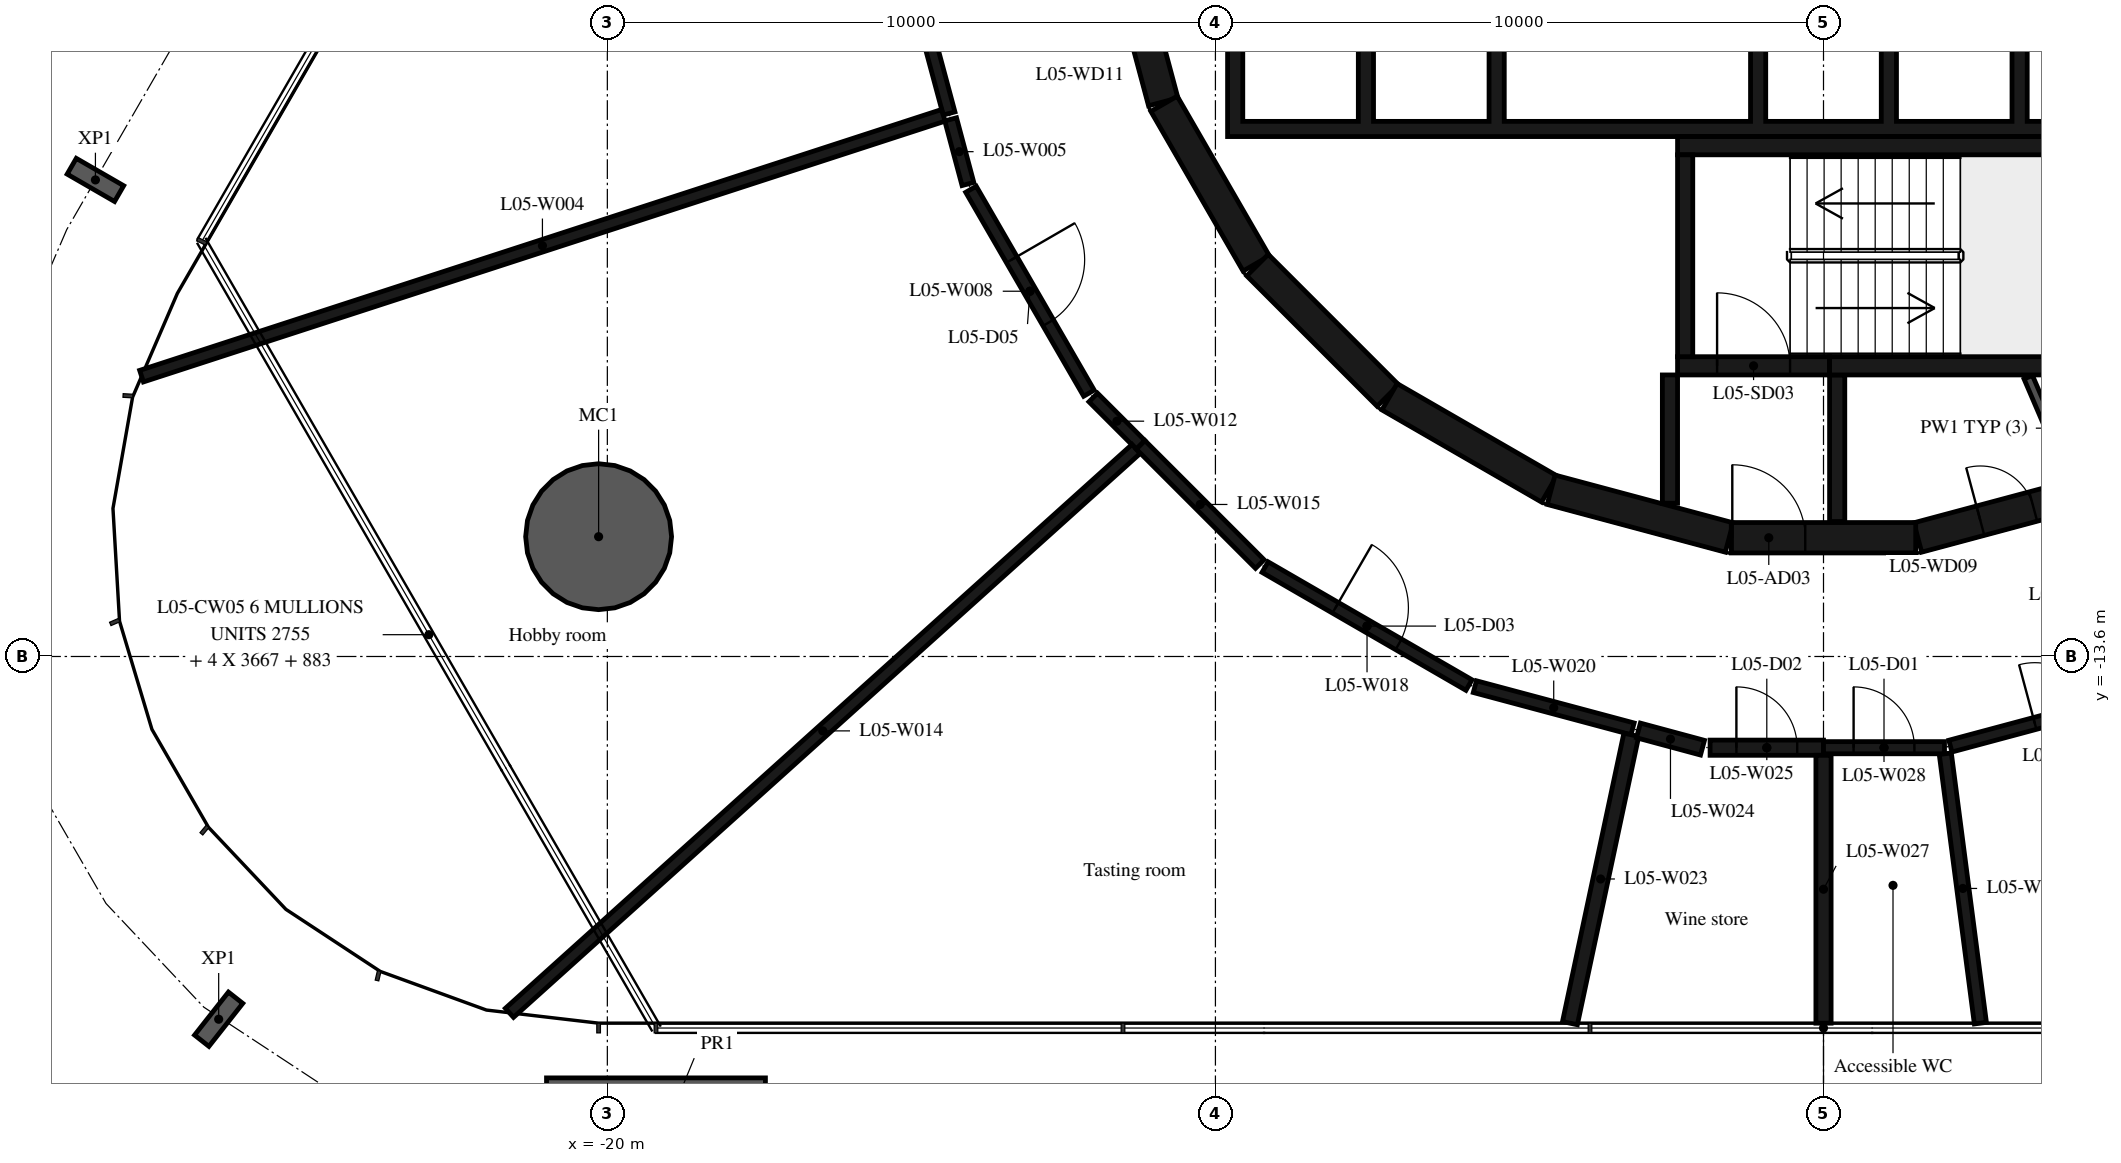
"""IFC4 building model, lengths in metres.
Left out: names, types, materials, properties, quantities, classifications, styles, units other than length and angle.
Written with IfcOpenShell. Run it as: python <this file> out.ifc"""

import sys

from ifc_helpers import new_model, si_unit, direction, frame, frame_2d, origin, origin_2d, place, context, subcontext, project, spatial, polyline, rectangle, hollow_circle, i_section, outline, extrude, element, fill, save


model = new_model("IFC4")
c1 = context("Model", 3, precision=1e-05, world=origin(), true_north=direction((0.0, 1.0)))
c2 = subcontext(c1, "Body", "Model", "MODEL_VIEW")
j1 = project(units=[si_unit("LENGTHUNIT", "METRE"), si_unit("PLANEANGLEUNIT", "RADIAN")], contexts=[c1])
p1 = place(None, origin())
s1 = spatial("IfcSite", under=j1, at=p1, CompositionType="ELEMENT")
p2 = place(p1, origin())
s2 = spatial("IfcBuilding", under=s1, at=p2, CompositionType="ELEMENT")
p3 = place(p2, frame((0.0, 0.0, 28.2)))
s3 = spatial("IfcBuildingStorey", under=s2, at=p3, CompositionType="ELEMENT", Elevation=28.2)
p4 = place(p3, frame((-20.144, -11.63, -0.38), z_axis=(0.0, 0.0, 1.0), x_axis=(1.0, 0.0, 0.0)))
e1 = element("IfcColumn", 1, at=p4, inside=s3, PredefinedType="COLUMN", context=c2, shape_type="SweptSolid", body=[
    extrude(hollow_circle(Radius=1.2, WallThickness=0.06, at=origin_2d()), origin(), (0.0, 0.0, 1.0), 4.73),
])
for number, where, z_axis, x_axis in (
    (2, (-28.419, -5.763, -0.38), (0.0, 0.0, 1.0), (0.5, 0.866, 0.0)),
    (3, (-26.392, -19.565, -0.38), (0.0, 0.0, 1.0), (-0.786, 0.619, 0.0)),
):
    element("IfcColumn", number, at=place(p3, frame(where, z_axis=z_axis, x_axis=x_axis)), inside=s3, PredefinedType="COLUMN", context=c2, shape_type="SweptSolid", body=[
        extrude(i_section(OverallWidth=0.3, OverallDepth=0.9, WebThickness=0.019, FlangeThickness=0.035, FilletRadius=0.03, at=origin_2d()), origin(), (0.0, 0.0, 1.0), 4.73),
    ])
p5 = place(p3, frame((-19.2, -21.73, -0.38), z_axis=(0.0, 0.0, 1.0), x_axis=(1.0, 0.0, 0.0)))
e4 = element("IfcColumn", 4, at=p5, inside=s3, PredefinedType="COLUMN", context=c2, shape_type="SweptSolid", body=[
    extrude(rectangle(XDim=3.6, YDim=2.4, at=origin_2d()), origin(), (0.0, 0.0, 1.0), 3.722),
])
p6 = place(p3, frame((1.55, -11.643, 0.0), z_axis=(0.0, 0.0, 1.0), x_axis=(0.965948410781, 0.258734743916, 0.0)))
e5 = element("IfcWall", 5, at=p6, inside=s3, PredefinedType="SHEAR", context=c2, shape_type="SweptSolid", body=[
    extrude(rectangle(XDim=3.033, YDim=0.5, at=frame_2d((1.516, 0.0))), origin(), (0.0, 0.0, 1.0), 4.35),
])
p7 = place(p6, frame((1.066, 0.0, 0.0)))
e6 = element("IfcOpeningElement", 6, at=p7, cuts=e5, PredefinedType="OPENING", context=c2, shape_type="SweptSolid", body=[
    extrude(rectangle(XDim=0.9, YDim=2.1, at=frame_2d((0.45, 1.05))), frame((0.0, 0.26, 0.0), z_axis=(0.0, -1.0, 0.0), x_axis=(1.0, 0.0, 0.0)), (0.0, 0.0, 1.0), 0.52),
])
p8 = place(p3, frame((-11.643, -1.55, 0.0), z_axis=(0.0, 0.0, 1.0), x_axis=(0.258734743916, -0.965948410781, 0.0)))
e7 = element("IfcWall", 7, at=p8, inside=s3, PredefinedType="SHEAR", context=c2, shape_type="SweptSolid", body=[
    extrude(rectangle(XDim=3.033, YDim=0.5, at=frame_2d((1.516, 0.0))), origin(), (0.0, 0.0, 1.0), 4.35),
])
p9 = place(p8, frame((1.066, 0.0, 0.0)))
e8 = element("IfcOpeningElement", 8, at=p9, cuts=e7, PredefinedType="OPENING", context=c2, shape_type="SweptSolid", body=[
    extrude(rectangle(XDim=0.9, YDim=2.1, at=frame_2d((0.45, 1.05))), frame((0.0, 0.26, 0.0), z_axis=(0.0, -1.0, 0.0), x_axis=(1.0, 0.0, 0.0)), (0.0, 0.0, 1.0), 0.52),
])
p10 = place(p3, frame((-10.845, -4.51, 0.0), z_axis=(0.0, 0.0, 1.0), x_axis=(0.500087131594, -0.865975092491, 0.0)))
e9 = element("IfcWall", 9, at=p10, inside=s3, PredefinedType="SHEAR", context=c2, shape_type="SweptSolid", body=[
    extrude(rectangle(XDim=3.033, YDim=0.5, at=frame_2d((1.516, 0.0))), origin(), (0.0, 0.0, 1.0), 4.35),
])
p11 = place(p3, frame((-9.308, -7.164, 0.0), z_axis=(0.0, 0.0, 1.0), x_axis=(0.707106781187, -0.707106781187, 0.0)))
e10 = element("IfcWall", 10, at=p11, inside=s3, PredefinedType="SHEAR", context=c2, shape_type="SweptSolid", body=[
    extrude(rectangle(XDim=3.032, YDim=0.5, at=frame_2d((1.516, 0.0))), origin(), (0.0, 0.0, 1.0), 4.35),
])
for number, where, z_axis, x_axis in (
    (11, (-7.137, -9.329, 0.0), (0.0, 0.0, 1.0), (0.866, -0.5, 0.0)),
    (12, (-4.479, -10.858, 0.0), (0.0, 0.0, 1.0), (0.966, -0.259, 0.0)),
):
    element("IfcWall", number, at=place(p3, frame(where, z_axis=z_axis, x_axis=x_axis)), inside=s3, PredefinedType="SHEAR", context=c2, shape_type="SweptSolid", body=[
        extrude(rectangle(XDim=3.033, YDim=0.5, at=frame_2d((1.516, 0.0))), origin(), (0.0, 0.0, 1.0), 4.35),
    ])
p12 = place(p3, frame((-1.516, -11.647, 0.0), z_axis=(0.0, 0.0, 1.0), x_axis=(1.0, 0.0, 0.0)))
e13 = element("IfcWall", 13, at=p12, inside=s3, PredefinedType="SHEAR", context=c2, shape_type="SweptSolid", body=[
    extrude(rectangle(XDim=3.033, YDim=0.5, at=frame_2d((1.516, 0.0))), origin(), (0.0, 0.0, 1.0), 4.35),
])
p13 = place(p12, frame((0.016, 0.0, 0.0)))
e14 = element("IfcOpeningElement", 14, at=p13, cuts=e13, PredefinedType="OPENING", context=c2, shape_type="SweptSolid", body=[
    extrude(rectangle(XDim=1.2, YDim=2.1, at=frame_2d((0.6, 1.05))), frame((0.0, 0.26, 0.0), z_axis=(0.0, -1.0, 0.0), x_axis=(1.0, 0.0, 0.0)), (0.0, 0.0, 1.0), 0.52),
])
p14 = place(p3, frame((-2.275, -8.67, 0.0), z_axis=(0.0, 0.0, 1.0), x_axis=(0.0, 1.0, 0.0)))
e15 = element("IfcWall", 15, at=p14, inside=s3, PredefinedType="SHEAR", context=c2, shape_type="SweptSolid", body=[
    extrude(rectangle(XDim=3.32, YDim=0.25, at=frame_2d((1.66, 0.0))), origin(), (0.0, 0.0, 1.0), 4.35),
])
p15 = place(p3, frame((-2.4, -5.2, 0.0), z_axis=(0.0, 0.0, 1.0), x_axis=(1.0, 0.0, 0.0)))
e16 = element("IfcWall", 16, at=p15, inside=s3, PredefinedType="SHEAR", context=c2, shape_type="SweptSolid", body=[
    extrude(rectangle(XDim=7.05, YDim=0.3, at=frame_2d((3.525, 0.0))), origin(), (0.0, 0.0, 1.0), 4.35),
])
p16 = place(p3, frame((0.1, -8.82, 0.0), z_axis=(0.0, 0.0, 1.0), x_axis=(1.0, 0.0, 0.0)))
e17 = element("IfcWall", 17, at=p16, inside=s3, PredefinedType="SHEAR", context=c2, shape_type="SweptSolid", body=[
    extrude(rectangle(XDim=4.55, YDim=0.3, at=frame_2d((2.275, 0.0))), origin(), (0.0, 0.0, 1.0), 4.35),
])
p17 = place(p3, frame((-2.4, -8.82, 0.0), z_axis=(0.0, 0.0, 1.0), x_axis=(1.0, 0.0, 0.0)))
e18 = element("IfcWall", 18, at=p17, inside=s3, PredefinedType="SHEAR", context=c2, shape_type="SweptSolid", body=[
    extrude(rectangle(XDim=2.5, YDim=0.3, at=frame_2d((1.25, 0.0))), origin(), (0.0, 0.0, 1.0), 4.35),
])
p18 = place(p17, frame((0.65, 0.0, 0.0)))
e19 = element("IfcOpeningElement", 19, at=p18, cuts=e18, PredefinedType="OPENING", context=c2, shape_type="SweptSolid", body=[
    extrude(rectangle(XDim=1.2, YDim=2.1, at=frame_2d((0.6, 1.05))), frame((0.0, 0.16, 0.0), z_axis=(0.0, -1.0, 0.0), x_axis=(1.0, 0.0, 0.0)), (0.0, 0.0, 1.0), 0.32),
])
p19 = place(p3, frame((-2.525, -8.97, 0.0), z_axis=(0.0, 0.0, 1.0), x_axis=(0.0, -1.0, 0.0)))
e20 = element("IfcWall", 20, at=p19, inside=s3, PredefinedType="SHEAR", context=c2, shape_type="SweptSolid", body=[
    extrude(rectangle(XDim=2.11, YDim=0.25, at=frame_2d((1.055, 0.0))), origin(), (0.0, 0.0, 1.0), 4.35),
])
p20 = place(p3, frame((0.225, -8.97, 0.0), z_axis=(0.0, 0.0, 1.0), x_axis=(0.0, -1.0, 0.0)))
e21 = element("IfcWall", 21, at=p20, inside=s3, PredefinedType="SHEAR", context=c2, shape_type="SweptSolid", body=[
    extrude(rectangle(XDim=2.41, YDim=0.25, at=frame_2d((1.205, 0.0))), origin(), (0.0, 0.0, 1.0), 4.35),
])
p21 = place(p3, origin())
e22 = element("IfcWall", 22, at=p21, inside=s3, PredefinedType="SHEAR", context=c2, shape_type="SweptSolid", body=[
    extrude(outline(polyline([(9.8, -5.05), (9.8, -4.8), (9.8, -1.9), (9.55, -1.9), (9.55, -4.8), (7.65, -4.8), (7.65, -1.9), (7.4, -1.9), (7.4, -4.8), (5.5, -4.8), (5.5, -1.9), (5.25, -1.9), (5.25, -4.8), (3.35, -4.8), (3.35, -1.9), (3.1, -1.9), (3.1, -4.8), (1.2, -4.8), (1.2, -1.9), (0.95, -1.9), (0.95, -4.8), (-0.95, -4.8), (-0.95, -1.9), (-1.2, -1.9), (-1.2, -4.8), (-5.25, -4.8), (-5.25, -1.9), (-5.5, -1.9), (-5.5, -4.8), (-7.4, -4.8), (-7.4, -1.9), (-7.65, -1.9), (-7.65, -4.8), (-9.55, -4.8), (-9.55, -1.9), (-9.8, -1.9), (-9.8, -4.8), (-9.8, -5.05), (9.8, -5.05)])), origin(), (0.0, 0.0, 1.0), 4.35),
])
p22 = place(p3, frame((3.367, -9.007, 0.0), z_axis=(0.0, 0.0, 1.0), x_axis=(0.394387482265, -0.918944238696, 0.0)))
e23 = element("IfcWall", 23, at=p22, inside=s3, PredefinedType="PARTITIONING", context=c2, shape_type="SweptSolid", body=[
    extrude(rectangle(XDim=1.825, YDim=0.15, at=frame_2d((0.913, 0.0))), origin(), (0.0, 0.0, 1.0), 4.35),
])
p23 = place(p3, frame((-15.1, -1.99, 0.0), z_axis=(0.0, 0.0, 1.0), x_axis=(0.259534891826, -0.96573373138, 0.0)))
e24 = element("IfcWall", 24, at=p23, inside=s3, PredefinedType="PARTITIONING", context=c2, shape_type="SweptSolid", body=[
    extrude(rectangle(XDim=2.775, YDim=0.2, at=frame_2d((1.387, 0.0))), origin(), (0.0, 0.0, 1.0), 4.35),
])
p24 = place(p3, frame((-14.475, -4.701, 0.0), z_axis=(0.0, 0.0, 1.0), x_axis=(-0.950949275071, -0.309346854262, 0.0)))
e25 = element("IfcWall", 25, at=p24, inside=s3, PredefinedType="PARTITIONING", context=c2, shape_type="SweptSolid", body=[
    extrude(rectangle(XDim=13.865, YDim=0.2, at=frame_2d((6.933, 0.0))), origin(), (0.0, 0.0, 1.0), 4.35),
])
p25 = place(p3, frame((-14.354, -4.767, 0.0), z_axis=(0.0, 0.0, 1.0), x_axis=(0.258159565639, -0.966102292032, 0.0)))
e26 = element("IfcWall", 26, at=p25, inside=s3, PredefinedType="PARTITIONING", context=c2, shape_type="SweptSolid", body=[
    extrude(rectangle(XDim=1.101, YDim=0.2, at=frame_2d((0.55, 0.0))), origin(), (0.0, 0.0, 1.0), 4.35),
])
p26 = place(p3, frame((-14.02, -5.917, 0.0), z_axis=(0.0, 0.0, 1.0), x_axis=(0.500733182901, -0.865601686425, 0.0)))
e27 = element("IfcWall", 27, at=p26, inside=s3, PredefinedType="PARTITIONING", context=c2, shape_type="SweptSolid", body=[
    extrude(rectangle(XDim=3.874, YDim=0.2, at=frame_2d((1.937, 0.0))), origin(), (0.0, 0.0, 1.0), 4.35),
])
p27 = place(p26, frame((1.337, 0.0, 0.0)))
e28 = element("IfcOpeningElement", 28, at=p27, cuts=e27, PredefinedType="OPENING", context=c2, shape_type="SweptSolid", body=[
    extrude(rectangle(XDim=1.2, YDim=2.1, at=frame_2d((0.6, 1.05))), frame((0.0, 0.11, 0.0), z_axis=(0.0, -1.0, 0.0), x_axis=(1.0, 0.0, 0.0)), (0.0, 0.0, 1.0), 0.22),
])
p28 = place(p3, frame((-12.009, -9.341, 0.0), z_axis=(0.0, 0.0, 1.0), x_axis=(0.707106781187, -0.707106781187, 0.0)))
e29 = element("IfcWall", 29, at=p28, inside=s3, PredefinedType="PARTITIONING", context=c2, shape_type="SweptSolid", body=[
    extrude(rectangle(XDim=1.102, YDim=0.2, at=frame_2d((0.551, 0.0))), origin(), (0.0, 0.0, 1.0), 4.35),
])
p29 = place(p3, frame((-11.304, -10.187, 0.0), z_axis=(0.0, 0.0, 1.0), x_axis=(-0.743362442769, -0.668888838807, 0.0)))
e30 = element("IfcWall", 30, at=p29, inside=s3, PredefinedType="PARTITIONING", context=c2, shape_type="SweptSolid", body=[
    extrude(rectangle(XDim=13.864, YDim=0.2, at=frame_2d((6.932, 0.0))), origin(), (0.0, 0.0, 1.0), 4.35),
])
p30 = place(p3, frame((-11.23, -10.12, 0.0), z_axis=(0.0, 0.0, 1.0), x_axis=(0.707106781187, -0.707106781187, 0.0)))
e31 = element("IfcWall", 31, at=p30, inside=s3, PredefinedType="PARTITIONING", context=c2, shape_type="SweptSolid", body=[
    extrude(rectangle(XDim=2.772, YDim=0.2, at=frame_2d((1.386, 0.0))), origin(), (0.0, 0.0, 1.0), 4.35),
])
p31 = place(p3, frame((-9.183, -12.13, 0.0), z_axis=(0.0, 0.0, 1.0), x_axis=(0.865585884642, -0.500760497952, 0.0)))
e32 = element("IfcWall", 32, at=p31, inside=s3, PredefinedType="PARTITIONING", context=c2, shape_type="SweptSolid", body=[
    extrude(rectangle(XDim=3.874, YDim=0.2, at=frame_2d((1.937, 0.0))), origin(), (0.0, 0.0, 1.0), 4.35),
])
p32 = place(p31, frame((1.337, 0.0, 0.0)))
e33 = element("IfcOpeningElement", 33, at=p32, cuts=e32, PredefinedType="OPENING", context=c2, shape_type="SweptSolid", body=[
    extrude(rectangle(XDim=1.2, YDim=2.1, at=frame_2d((0.6, 1.05))), frame((0.0, 0.11, 0.0), z_axis=(0.0, -1.0, 0.0), x_axis=(1.0, 0.0, 0.0)), (0.0, 0.0, 1.0), 0.22),
])
p33 = place(p3, frame((-5.733, -14.096, 0.0), z_axis=(0.0, 0.0, 1.0), x_axis=(0.966003629213, -0.25852850587, 0.0)))
e34 = element("IfcWall", 34, at=p33, inside=s3, PredefinedType="PARTITIONING", context=c2, shape_type="SweptSolid", body=[
    extrude(rectangle(XDim=2.685, YDim=0.2, at=frame_2d((1.342, 0.0))), origin(), (0.0, 0.0, 1.0), 4.35),
])
p34 = place(p3, frame((-3.161, -14.888, 0.0), z_axis=(0.0, 0.0, 1.0), x_axis=(-0.208118919353, -0.978103530005, 0.0)))
e35 = element("IfcWall", 35, at=p34, inside=s3, PredefinedType="PARTITIONING", context=c2, shape_type="SweptSolid", body=[
    extrude(rectangle(XDim=4.848, YDim=0.25, at=frame_2d((2.424, 0.0))), origin(), (0.0, 0.0, 1.0), 4.35),
])
p35 = place(p3, frame((-3.043, -14.816, 0.0), z_axis=(0.0, 0.0, 1.0), x_axis=(0.965488181203, -0.260446869738, 0.0)))
e36 = element("IfcWall", 36, at=p35, inside=s3, PredefinedType="PARTITIONING", context=c2, shape_type="SweptSolid", body=[
    extrude(rectangle(XDim=1.091, YDim=0.25, at=frame_2d((0.545, 0.0))), origin(), (0.0, 0.0, 1.0), 4.35),
])
p36 = place(p3, frame((-1.865, -15.1, 0.0), z_axis=(0.0, 0.0, 1.0), x_axis=(1.0, 0.0, 0.0)))
e37 = element("IfcWall", 37, at=p36, inside=s3, PredefinedType="PARTITIONING", context=c2, shape_type="SweptSolid", body=[
    extrude(rectangle(XDim=1.865, YDim=0.25, at=frame_2d((0.933, 0.0))), origin(), (0.0, 0.0, 1.0), 4.35),
])
p37 = place(p36, frame((0.433, 0.0, 0.0)))
e38 = element("IfcOpeningElement", 38, at=p37, cuts=e37, PredefinedType="OPENING", context=c2, shape_type="SweptSolid", body=[
    extrude(rectangle(XDim=1.0, YDim=2.1, at=frame_2d((0.5, 1.05))), frame((0.0, 0.135, 0.0), z_axis=(0.0, -1.0, 0.0), x_axis=(1.0, 0.0, 0.0)), (0.0, 0.0, 1.0), 0.27),
])
p38 = place(p3, frame((0.0, -15.225, 0.0), z_axis=(0.0, 0.0, 1.0), x_axis=(0.0, -1.0, 0.0)))
e39 = element("IfcWall", 39, at=p38, inside=s3, PredefinedType="PARTITIONING", context=c2, shape_type="SweptSolid", body=[
    extrude(rectangle(XDim=4.405, YDim=0.25, at=frame_2d((2.202, 0.0))), origin(), (0.0, 0.0, 1.0), 4.35),
])
p39 = place(p3, frame((0.0, -15.1, 0.0), z_axis=(0.0, 0.0, 1.0), x_axis=(1.0, 0.0, 0.0)))
e40 = element("IfcWall", 40, at=p39, inside=s3, PredefinedType="PARTITIONING", context=c2, shape_type="SweptSolid", body=[
    extrude(rectangle(XDim=1.99, YDim=0.2, at=frame_2d((0.995, 0.0))), origin(), (0.0, 0.0, 1.0), 4.35),
])
p40 = place(p39, frame((0.495, 0.0, 0.0)))
e41 = element("IfcOpeningElement", 41, at=p40, cuts=e40, PredefinedType="OPENING", context=c2, shape_type="SweptSolid", body=[
    extrude(rectangle(XDim=1.0, YDim=2.1, at=frame_2d((0.5, 1.05))), frame((0.0, 0.11, 0.0), z_axis=(0.0, -1.0, 0.0), x_axis=(1.0, 0.0, 0.0)), (0.0, 0.0, 1.0), 0.22),
])
p41 = place(p3, frame((2.003, -15.199, 0.0), z_axis=(0.0, 0.0, 1.0), x_axis=(0.129170993983, -0.991622334517, 0.0)))
e42 = element("IfcWall", 42, at=p41, inside=s3, PredefinedType="PARTITIONING", context=c2, shape_type="SweptSolid", body=[
    extrude(rectangle(XDim=4.468, YDim=0.2, at=frame_2d((2.234, 0.0))), origin(), (0.0, 0.0, 1.0), 4.35),
])
p42 = place(p3, frame((2.087, -15.074, 0.0), z_axis=(0.0, 0.0, 1.0), x_axis=(0.965870133458, 0.259026804199, 0.0)))
e43 = element("IfcWall", 43, at=p42, inside=s3, PredefinedType="PARTITIONING", context=c2, shape_type="SweptSolid", body=[
    extrude(rectangle(XDim=3.876, YDim=0.2, at=frame_2d((1.938, 0.0))), origin(), (0.0, 0.0, 1.0), 4.35),
])
p43 = place(p42, frame((1.438, 0.0, 0.0)))
e44 = element("IfcOpeningElement", 44, at=p43, cuts=e43, PredefinedType="OPENING", context=c2, shape_type="SweptSolid", body=[
    extrude(rectangle(XDim=1.0, YDim=2.1, at=frame_2d((0.5, 1.05))), frame((0.0, 0.11, 0.0), z_axis=(0.0, -1.0, 0.0), x_axis=(1.0, 0.0, 0.0)), (0.0, 0.0, 1.0), 0.22),
])
p44 = place(p18, origin())
e45 = element("IfcDoor", 45, at=p44, inside=s3, OperationType="SINGLE_SWING_LEFT", PredefinedType="DOOR", context=c2, shape_type="SweptSolid", body=[
    extrude(rectangle(XDim=1.2, YDim=2.1, at=frame_2d((0.6, 1.05))), frame((0.0, 0.025, 0.0), z_axis=(0.0, -1.0, 0.0), x_axis=(1.0, 0.0, 0.0)), (0.0, 0.0, 1.0), 0.05),
])
fill(e19, e45)
p45 = place(p13, origin())
e46 = element("IfcDoor", 46, at=p45, inside=s3, OperationType="SINGLE_SWING_RIGHT", PredefinedType="DOOR", context=c2, shape_type="SweptSolid", body=[
    extrude(rectangle(XDim=1.2, YDim=2.1, at=frame_2d((0.6, 1.05))), frame((0.0, 0.025, 0.0), z_axis=(0.0, -1.0, 0.0), x_axis=(1.0, 0.0, 0.0)), (0.0, 0.0, 1.0), 0.05),
])
fill(e14, e46)
p46 = place(p7, origin())
e47 = element("IfcDoor", 47, at=p46, inside=s3, OperationType="SINGLE_SWING_RIGHT", PredefinedType="DOOR", context=c2, shape_type="SweptSolid", body=[
    extrude(rectangle(XDim=0.9, YDim=2.1, at=frame_2d((0.45, 1.05))), frame((0.0, 0.025, 0.0), z_axis=(0.0, -1.0, 0.0), x_axis=(1.0, 0.0, 0.0)), (0.0, 0.0, 1.0), 0.05),
])
fill(e6, e47)
p47 = place(p40, origin())
e48 = element("IfcDoor", 48, at=p47, inside=s3, OperationType="SINGLE_SWING_LEFT", PredefinedType="DOOR", context=c2, shape_type="SweptSolid", body=[
    extrude(rectangle(XDim=1.0, YDim=2.1, at=frame_2d((0.5, 1.05))), frame((0.0, 0.025, 0.0), z_axis=(0.0, -1.0, 0.0), x_axis=(1.0, 0.0, 0.0)), (0.0, 0.0, 1.0), 0.05),
])
fill(e41, e48)
p48 = place(p37, origin())
e49 = element("IfcDoor", 49, at=p48, inside=s3, OperationType="SINGLE_SWING_LEFT", PredefinedType="DOOR", context=c2, shape_type="SweptSolid", body=[
    extrude(rectangle(XDim=1.0, YDim=2.1, at=frame_2d((0.5, 1.05))), frame((0.0, 0.025, 0.0), z_axis=(0.0, -1.0, 0.0), x_axis=(1.0, 0.0, 0.0)), (0.0, 0.0, 1.0), 0.05),
])
fill(e38, e49)
p49 = place(p32, origin())
e50 = element("IfcDoor", 50, at=p49, inside=s3, OperationType="SINGLE_SWING_LEFT", PredefinedType="DOOR", context=c2, shape_type="SweptSolid", body=[
    extrude(rectangle(XDim=1.2, YDim=2.1, at=frame_2d((0.6, 1.05))), frame((0.0, 0.025, 0.0), z_axis=(0.0, -1.0, 0.0), x_axis=(1.0, 0.0, 0.0)), (0.0, 0.0, 1.0), 0.05),
])
fill(e33, e50)
p50 = place(p43, origin())
e51 = element("IfcDoor", 51, at=p50, inside=s3, OperationType="SINGLE_SWING_LEFT", PredefinedType="DOOR", context=c2, shape_type="SweptSolid", body=[
    extrude(rectangle(XDim=1.0, YDim=2.1, at=frame_2d((0.5, 1.05))), frame((0.0, 0.025, 0.0), z_axis=(0.0, -1.0, 0.0), x_axis=(1.0, 0.0, 0.0)), (0.0, 0.0, 1.0), 0.05),
])
fill(e44, e51)
p51 = place(p27, origin())
e52 = element("IfcDoor", 52, at=p51, inside=s3, OperationType="SINGLE_SWING_LEFT", PredefinedType="DOOR", context=c2, shape_type="SweptSolid", body=[
    extrude(rectangle(XDim=1.2, YDim=2.1, at=frame_2d((0.6, 1.05))), frame((0.0, 0.025, 0.0), z_axis=(0.0, -1.0, 0.0), x_axis=(1.0, 0.0, 0.0)), (0.0, 0.0, 1.0), 0.05),
])
fill(e28, e52)
save(model, sys.argv[1])
